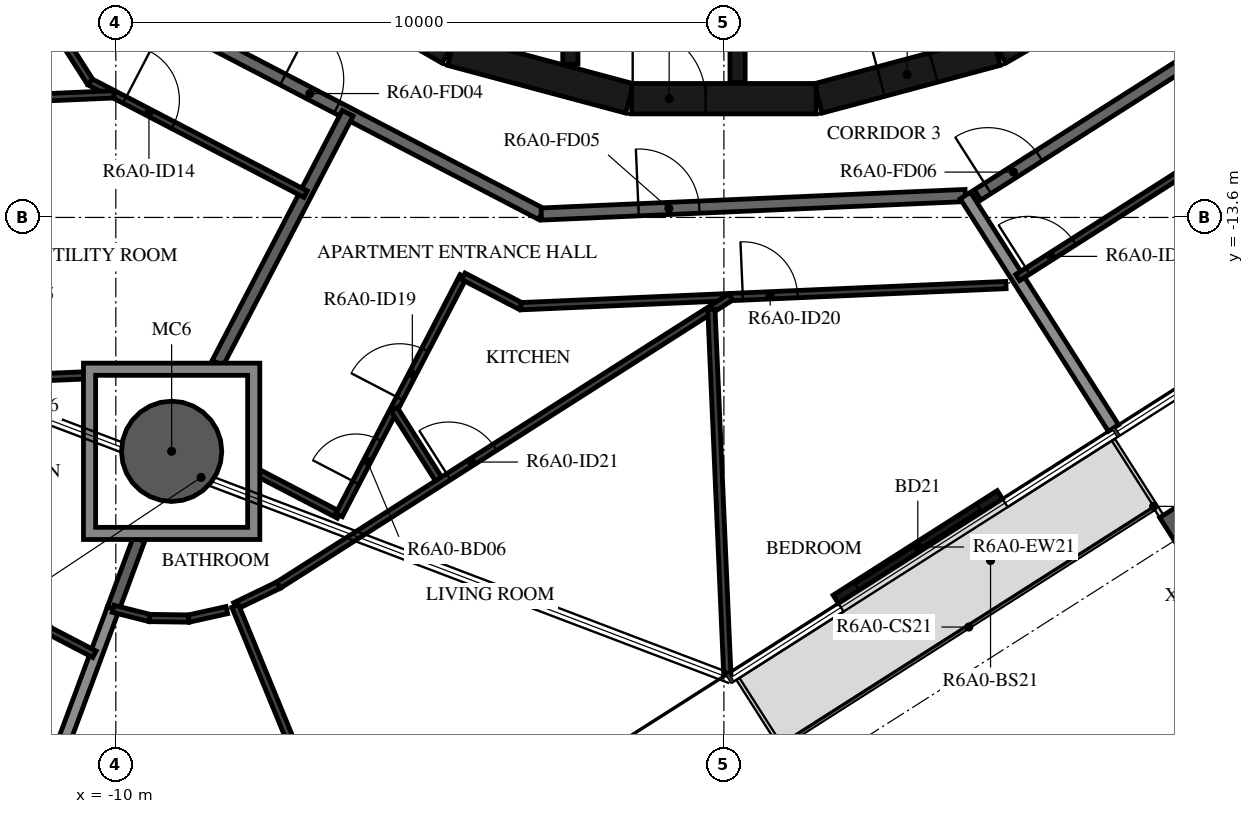
"""IFC4 building model, lengths in metres.
Left out: names, types, materials, properties, quantities, classifications, styles, units other than length and angle.
Written with IfcOpenShell. Run it as: python <this file> out.ifc"""

import sys

from ifc_helpers import new_model, si_unit, direction, frame, frame_2d, origin, origin_2d, place, context, subcontext, project, spatial, polyline, rectangle, hollow_circle, i_section, outline, extrude, element, fill, save


model = new_model("IFC4")
c1 = context("Model", 3, precision=1e-05, world=origin(), true_north=direction((0.0, 1.0)))
c2 = subcontext(c1, "Body", "Model", "MODEL_VIEW")
j1 = project(units=[si_unit("LENGTHUNIT", "METRE"), si_unit("PLANEANGLEUNIT", "RADIAN")], contexts=[c1])
p1 = place(None, origin())
s1 = spatial("IfcSite", under=j1, at=p1, CompositionType="ELEMENT")
p2 = place(p1, origin())
s2 = spatial("IfcBuilding", under=s1, at=p2, CompositionType="ELEMENT")
p3 = place(p2, frame((0.0, 0.0, 233.7)))
s3 = spatial("IfcBuildingStorey", under=s2, at=p3, CompositionType="ELEMENT", Elevation=233.7)
p4 = place(p3, frame((-9.082, -17.446, -0.38), z_axis=(0.0, 0.0, 1.0), x_axis=(1.0, 0.0, 0.0)))
e1 = element("IfcColumn", 1, at=p4, inside=s3, PredefinedType="COLUMN", context=c2, shape_type="SweptSolid", body=[
    extrude(hollow_circle(Radius=0.825, WallThickness=0.04, at=origin_2d()), origin(), (0.0, 0.0, 1.0), 3.5),
])
p5 = place(p3, frame((7.535, -18.835, -0.38), z_axis=(0.0, 0.0, 1.0), x_axis=(-0.843391139633, -0.537300088953, 0.0)))
e2 = element("IfcColumn", 2, at=p5, inside=s3, PredefinedType="COLUMN", context=c2, shape_type="SweptSolid", body=[
    extrude(i_section(OverallWidth=0.3, OverallDepth=0.9, WebThickness=0.019, FlangeThickness=0.035, FilletRadius=0.03, at=origin_2d()), origin(), (0.0, 0.0, 1.0), 3.5),
])
p6 = place(p3, frame((1.839, -19.879, 0.0), z_axis=(0.0, 0.0, 1.0), x_axis=(0.843419508298, 0.53725555653, 0.0)))
e3 = element("IfcWall", 3, at=p6, inside=s3, PredefinedType="STANDARD", context=c2, shape_type="SweptSolid", body=[
    extrude(rectangle(XDim=3.2, YDim=0.16, at=frame_2d((1.6, 0.0))), origin(), (0.0, 0.0, 1.0), 3.12),
])
p7 = place(p6, frame((0.4, 0.0, 0.0)))
e4 = element("IfcOpeningElement", 4, at=p7, cuts=e3, PredefinedType="OPENING", context=c2, shape_type="SweptSolid", body=[
    extrude(rectangle(XDim=2.4, YDim=2.4, at=frame_2d((1.2, 1.2))), frame((0.0, 0.09, 0.0), z_axis=(0.0, -1.0, 0.0), x_axis=(1.0, 0.0, 0.0)), (0.0, 0.0, 1.0), 0.18),
])
p8 = place(p3, frame((1.55, -11.643, 0.0), z_axis=(0.0, 0.0, 1.0), x_axis=(0.965948410781, 0.258734743916, 0.0)))
e5 = element("IfcWall", 5, at=p8, inside=s3, PredefinedType="SHEAR", context=c2, shape_type="SweptSolid", body=[
    extrude(rectangle(XDim=3.033, YDim=0.5, at=frame_2d((1.516, 0.0))), origin(), (0.0, 0.0, 1.0), 3.12),
])
p9 = place(p8, frame((1.066, 0.0, 0.0)))
e6 = element("IfcOpeningElement", 6, at=p9, cuts=e5, PredefinedType="OPENING", context=c2, shape_type="SweptSolid", body=[
    extrude(rectangle(XDim=0.9, YDim=2.1, at=frame_2d((0.45, 1.05))), frame((0.0, 0.26, 0.0), z_axis=(0.0, -1.0, 0.0), x_axis=(1.0, 0.0, 0.0)), (0.0, 0.0, 1.0), 0.52),
])
for number, where, z_axis, x_axis in (
    (7, (4.51, -10.845, 0.0), (0.0, 0.0, 1.0), (0.866, 0.5, 0.0)),
    (8, (-7.137, -9.329, 0.0), (0.0, 0.0, 1.0), (0.866, -0.5, 0.0)),
    (9, (-4.479, -10.858, 0.0), (0.0, 0.0, 1.0), (0.966, -0.259, 0.0)),
):
    element("IfcWall", number, at=place(p3, frame(where, z_axis=z_axis, x_axis=x_axis)), inside=s3, PredefinedType="SHEAR", context=c2, shape_type="SweptSolid", body=[
        extrude(rectangle(XDim=3.033, YDim=0.5, at=frame_2d((1.516, 0.0))), origin(), (0.0, 0.0, 1.0), 3.12),
    ])
p10 = place(p3, frame((-1.516, -11.647, 0.0), z_axis=(0.0, 0.0, 1.0), x_axis=(1.0, 0.0, 0.0)))
e10 = element("IfcWall", 10, at=p10, inside=s3, PredefinedType="SHEAR", context=c2, shape_type="SweptSolid", body=[
    extrude(rectangle(XDim=3.033, YDim=0.5, at=frame_2d((1.516, 0.0))), origin(), (0.0, 0.0, 1.0), 3.12),
])
p11 = place(p10, frame((0.016, 0.0, 0.0)))
e11 = element("IfcOpeningElement", 11, at=p11, cuts=e10, PredefinedType="OPENING", context=c2, shape_type="SweptSolid", body=[
    extrude(rectangle(XDim=1.2, YDim=2.1, at=frame_2d((0.6, 1.05))), frame((0.0, 0.26, 0.0), z_axis=(0.0, -1.0, 0.0), x_axis=(1.0, 0.0, 0.0)), (0.0, 0.0, 1.0), 0.52),
])
p12 = place(p3, frame((-2.525, -8.97, 0.0), z_axis=(0.0, 0.0, 1.0), x_axis=(0.0, -1.0, 0.0)))
e12 = element("IfcWall", 12, at=p12, inside=s3, PredefinedType="SHEAR", context=c2, shape_type="SweptSolid", body=[
    extrude(rectangle(XDim=2.11, YDim=0.25, at=frame_2d((1.055, 0.0))), origin(), (0.0, 0.0, 1.0), 3.12),
])
p13 = place(p3, frame((0.225, -8.97, 0.0), z_axis=(0.0, 0.0, 1.0), x_axis=(0.0, -1.0, 0.0)))
e13 = element("IfcWall", 13, at=p13, inside=s3, PredefinedType="SHEAR", context=c2, shape_type="SweptSolid", body=[
    extrude(rectangle(XDim=2.41, YDim=0.25, at=frame_2d((1.205, 0.0))), origin(), (0.0, 0.0, 1.0), 3.12),
])
p14 = place(p3, frame((-9.372, -10.228, 0.0), z_axis=(0.0, 0.0, 1.0), x_axis=(0.887005184532, -0.461759464021, 0.0)))
e14 = element("IfcWall", 14, at=p14, inside=s3, PredefinedType="STANDARD", context=c2, shape_type="SweptSolid", body=[
    extrude(rectangle(XDim=7.181, YDim=0.2, at=frame_2d((3.591, 0.0))), origin(), (0.0, 0.0, 1.0), 3.12),
])
p15 = place(p14, frame((2.391, 0.0, 0.0)))
e15 = element("IfcOpeningElement", 15, at=p15, cuts=e14, PredefinedType="OPENING", context=c2, shape_type="SweptSolid", body=[
    extrude(rectangle(XDim=1.0, YDim=2.1, at=frame_2d((0.5, 1.05))), frame((0.0, 0.11, 0.0), z_axis=(0.0, -1.0, 0.0), x_axis=(1.0, 0.0, 0.0)), (0.0, 0.0, 1.0), 0.22),
])
p16 = place(p3, frame((-3.003, -13.544, 0.0), z_axis=(0.0, 0.0, 1.0), x_axis=(0.999048221872, 0.043619380718, 0.0)))
e16 = element("IfcWall", 16, at=p16, inside=s3, PredefinedType="STANDARD", context=c2, shape_type="SweptSolid", body=[
    extrude(rectangle(XDim=6.979, YDim=0.2, at=frame_2d((3.49, 0.0))), origin(), (0.0, 0.0, 1.0), 3.12),
])
p17 = place(p16, frame((1.6, 0.0, 0.0)))
e17 = element("IfcOpeningElement", 17, at=p17, cuts=e16, PredefinedType="OPENING", context=c2, shape_type="SweptSolid", body=[
    extrude(rectangle(XDim=1.0, YDim=2.1, at=frame_2d((0.5, 1.05))), frame((0.0, 0.11, 0.0), z_axis=(0.0, -1.0, 0.0), x_axis=(1.0, 0.0, 0.0)), (0.0, 0.0, 1.0), 0.22),
])
p18 = place(p3, frame((4.172, -13.231, 0.0), z_axis=(0.0, 0.0, 1.0), x_axis=(0.843388394728, 0.537304397561, 0.0)))
e18 = element("IfcWall", 18, at=p18, inside=s3, PredefinedType="STANDARD", context=c2, shape_type="SweptSolid", body=[
    extrude(rectangle(XDim=7.181, YDim=0.2, at=frame_2d((3.59, 0.0))), origin(), (0.0, 0.0, 1.0), 3.12),
])
p19 = place(p18, frame((0.2, 0.0, 0.0)))
e19 = element("IfcOpeningElement", 19, at=p19, cuts=e18, PredefinedType="OPENING", context=c2, shape_type="SweptSolid", body=[
    extrude(rectangle(XDim=1.0, YDim=2.1, at=frame_2d((0.5, 1.05))), frame((0.0, 0.11, 0.0), z_axis=(0.0, -1.0, 0.0), x_axis=(1.0, 0.0, 0.0)), (0.0, 0.0, 1.0), 0.22),
])
p20 = place(p3, frame((-8.326, -15.996, 0.0), z_axis=(0.0, 0.0, 1.0), x_axis=(0.461739255077, 0.887015704664, 0.0)))
e20 = element("IfcWall", 20, at=p20, inside=s3, PredefinedType="STANDARD", context=c2, shape_type="SweptSolid", body=[
    extrude(rectangle(XDim=4.633, YDim=0.2, at=frame_2d((2.317, 0.0))), origin(), (0.0, 0.0, 1.0), 3.12),
])
p21 = place(p3, frame((-11.865, -24.939, 0.0), z_axis=(0.0, 0.0, 1.0), x_axis=(0.348236919929, 0.937406554062, 0.0)))
e21 = element("IfcWall", 21, at=p21, inside=s3, PredefinedType="STANDARD", context=c2, shape_type="SweptSolid", body=[
    extrude(rectangle(XDim=5.231, YDim=0.2, at=frame_2d((2.615, 0.0))), origin(), (0.0, 0.0, 1.0), 2.73),
])
p22 = place(p3, frame((-10.044, -20.036, 0.0), z_axis=(0.0, 0.0, 1.0), x_axis=(0.348282344491, 0.937389678051, 0.0)))
e22 = element("IfcWall", 22, at=p22, inside=s3, PredefinedType="STANDARD", context=c2, shape_type="SweptSolid", body=[
    extrude(rectangle(XDim=1.216, YDim=0.2, at=frame_2d((0.608, 0.0))), origin(), (0.0, 0.0, 1.0), 3.12),
])
p23 = place(p3, frame((6.407, -17.064, 0.0), z_axis=(0.0, 0.0, 1.0), x_axis=(-0.537324777979, 0.843375410461, 0.0)))
e23 = element("IfcWall", 23, at=p23, inside=s3, PredefinedType="STANDARD", context=c2, shape_type="SweptSolid", body=[
    extrude(rectangle(XDim=4.535, YDim=0.2, at=frame_2d((2.268, 0.0))), origin(), (0.0, 0.0, 1.0), 2.73),
])
p24 = place(p3, frame((-13.137, -7.111, 0.0), z_axis=(0.0, 0.0, 1.0), x_axis=(0.537300549444, -0.843390846267, 0.0)))
e24 = element("IfcWall", 24, at=p24, inside=s3, PredefinedType="PARTITIONING", context=c2, shape_type="SweptSolid", body=[
    extrude(rectangle(XDim=5.054, YDim=0.12, at=frame_2d((2.527, 0.0))), origin(), (0.0, 0.0, 1.0), 3.12),
])
p25 = place(p24, frame((1.5, 0.0, 0.0)))
e25 = element("IfcOpeningElement", 25, at=p25, cuts=e24, PredefinedType="OPENING", context=c2, shape_type="SweptSolid", body=[
    extrude(rectangle(XDim=0.8, YDim=2.1, at=frame_2d((0.4, 1.05))), frame((0.0, 0.07, 0.0), z_axis=(0.0, -1.0, 0.0), x_axis=(1.0, 0.0, 0.0)), (0.0, 0.0, 1.0), 0.14),
])
p26 = place(p3, frame((-10.421, -11.373, 0.0), z_axis=(0.0, 0.0, 1.0), x_axis=(0.887006451745, -0.461757029792, 0.0)))
e26 = element("IfcWall", 26, at=p26, inside=s3, PredefinedType="PARTITIONING", context=c2, shape_type="SweptSolid", body=[
    extrude(rectangle(XDim=3.992, YDim=0.12, at=frame_2d((1.996, 0.0))), origin(), (0.0, 0.0, 1.0), 3.12),
])
p27 = place(p26, frame((0.639, 0.0, 0.0)))
e27 = element("IfcOpeningElement", 27, at=p27, cuts=e26, PredefinedType="OPENING", context=c2, shape_type="SweptSolid", body=[
    extrude(rectangle(XDim=0.9, YDim=2.1, at=frame_2d((0.45, 1.05))), frame((0.0, 0.07, 0.0), z_axis=(0.0, -1.0, 0.0), x_axis=(1.0, 0.0, 0.0)), (0.0, 0.0, 1.0), 0.14),
])
p28 = place(p3, frame((-12.936, -11.703, 0.0), z_axis=(0.0, 0.0, 1.0), x_axis=(0.999046310188, 0.043663143495, 0.0)))
e28 = element("IfcWall", 28, at=p28, inside=s3, PredefinedType="PARTITIONING", context=c2, shape_type="SweptSolid", body=[
    extrude(rectangle(XDim=2.907, YDim=0.12, at=frame_2d((1.454, 0.0))), origin(), (0.0, 0.0, 1.0), 3.12),
])
p29 = place(p3, frame((-12.736, -16.295, 0.0), z_axis=(0.0, 0.0, 1.0), x_axis=(0.999043796611, 0.043720618177, 0.0)))
e29 = element("IfcWall", 29, at=p29, inside=s3, PredefinedType="PARTITIONING", context=c2, shape_type="SweptSolid", body=[
    extrude(rectangle(XDim=2.206, YDim=0.12, at=frame_2d((1.103, 0.0))), origin(), (0.0, 0.0, 1.0), 3.12),
])
p30 = place(p29, frame((0.6, 0.0, 0.0)))
e30 = element("IfcOpeningElement", 30, at=p30, cuts=e29, PredefinedType="OPENING", context=c2, shape_type="SweptSolid", body=[
    extrude(rectangle(XDim=0.9, YDim=2.1, at=frame_2d((0.45, 1.05))), frame((0.0, 0.07, 0.0), z_axis=(0.0, -1.0, 0.0), x_axis=(1.0, 0.0, 0.0)), (0.0, 0.0, 1.0), 0.14),
])
p31 = place(p3, frame((-10.352, -20.783, 0.0), z_axis=(0.0, 0.0, 1.0), x_axis=(-0.886941739106, 0.461881317475, 0.0)))
e31 = element("IfcWall", 31, at=p31, inside=s3, PredefinedType="PARTITIONING", context=c2, shape_type="SweptSolid", body=[
    extrude(rectangle(XDim=0.829, YDim=0.12, at=frame_2d((0.415, 0.0))), origin(), (0.0, 0.0, 1.0), 3.12),
])
p32 = place(p3, frame((-7.632, -17.815, 0.0), z_axis=(0.0, 0.0, 1.0), x_axis=(0.886960889958, -0.461844540602, 0.0)))
e32 = element("IfcWall", 32, at=p32, inside=s3, PredefinedType="PARTITIONING", context=c2, shape_type="SweptSolid", body=[
    extrude(rectangle(XDim=1.469, YDim=0.12, at=frame_2d((0.734, 0.0))), origin(), (0.0, 0.0, 1.0), 3.12),
])
p33 = place(p3, frame((-6.329, -18.494, 0.0), z_axis=(0.0, 0.0, 1.0), x_axis=(0.461759058182, 0.887005395805, 0.0)))
e33 = element("IfcWall", 33, at=p33, inside=s3, PredefinedType="PARTITIONING", context=c2, shape_type="SweptSolid", body=[
    extrude(rectangle(XDim=4.427, YDim=0.12, at=frame_2d((2.213, 0.0))), origin(), (0.0, 0.0, 1.0), 3.12),
])
p34 = place(p33, frame((0.6, 0.0, 0.0)))
e34 = element("IfcOpeningElement", 34, at=p34, cuts=e33, PredefinedType="OPENING", context=c2, shape_type="SweptSolid", body=[
    extrude(rectangle(XDim=0.8, YDim=2.1, at=frame_2d((0.4, 1.05))), frame((0.0, 0.07, 0.0), z_axis=(0.0, -1.0, 0.0), x_axis=(1.0, 0.0, 0.0)), (0.0, 0.0, 1.0), 0.14),
])
p35 = place(p33, frame((2.161, 0.0, 0.0)))
e35 = element("IfcOpeningElement", 35, at=p35, cuts=e33, PredefinedType="OPENING", context=c2, shape_type="SweptSolid", body=[
    extrude(rectangle(XDim=0.9, YDim=2.1, at=frame_2d((0.45, 1.05))), frame((0.0, 0.07, 0.0), z_axis=(0.0, -1.0, 0.0), x_axis=(1.0, 0.0, 0.0)), (0.0, 0.0, 1.0), 0.14),
])
p36 = place(p3, frame((-4.285, -14.567, 0.0), z_axis=(0.0, 0.0, 1.0), x_axis=(0.887033177378, -0.46170568789, 0.0)))
e36 = element("IfcWall", 36, at=p36, inside=s3, PredefinedType="PARTITIONING", context=c2, shape_type="SweptSolid", body=[
    extrude(rectangle(XDim=1.067, YDim=0.12, at=frame_2d((0.534, 0.0))), origin(), (0.0, 0.0, 1.0), 3.12),
])
p37 = place(p3, frame((-3.339, -15.06, 0.0), z_axis=(0.0, 0.0, 1.0), x_axis=(0.999047716945, 0.043630943905, 0.0)))
e37 = element("IfcWall", 37, at=p37, inside=s3, PredefinedType="PARTITIONING", context=c2, shape_type="SweptSolid", body=[
    extrude(rectangle(XDim=7.985, YDim=0.12, at=frame_2d((3.992, 0.0))), origin(), (0.0, 0.0, 1.0), 3.12),
])
p38 = place(p37, frame((3.654, 0.0, 0.0)))
e38 = element("IfcOpeningElement", 38, at=p38, cuts=e37, PredefinedType="OPENING", context=c2, shape_type="SweptSolid", body=[
    extrude(rectangle(XDim=0.9, YDim=2.1, at=frame_2d((0.45, 1.05))), frame((0.0, 0.07, 0.0), z_axis=(0.0, -1.0, 0.0), x_axis=(1.0, 0.0, 0.0)), (0.0, 0.0, 1.0), 0.14),
])
p39 = place(p3, frame((-10.044, -20.036, 0.0), z_axis=(0.0, 0.0, 1.0), x_axis=(0.969630684539, -0.24457378355, 0.0)))
e39 = element("IfcWall", 39, at=p39, inside=s3, PredefinedType="PARTITIONING", context=c2, shape_type="SweptSolid", body=[
    extrude(rectangle(XDim=0.62, YDim=0.12, at=frame_2d((0.31, 0.0))), origin(), (0.0, 0.0, 1.0), 3.12),
])
for number, where, z_axis, x_axis in (
    (40, (-9.443, -20.187, 0.0), (0.0, 0.0, 1.0), (1.0, -0.014, 0.0)),
    (41, (-8.801, -20.197, 0.0), (0.0, 0.0, 1.0), (0.976, 0.216, 0.0)),
):
    element("IfcWall", number, at=place(p3, frame(where, z_axis=z_axis, x_axis=x_axis)), inside=s3, PredefinedType="PARTITIONING", context=c2, shape_type="SweptSolid", body=[
        extrude(rectangle(XDim=0.642, YDim=0.12, at=frame_2d((0.321, 0.0))), origin(), (0.0, 0.0, 1.0), 3.12),
    ])
p40 = place(p3, frame((-4.662, -17.95, 0.0), z_axis=(0.0, 0.0, 1.0), x_axis=(-0.537254271207, 0.843420327043, 0.0)))
e42 = element("IfcWall", 42, at=p40, inside=s3, PredefinedType="PARTITIONING", context=c2, shape_type="SweptSolid", body=[
    extrude(rectangle(XDim=1.418, YDim=0.12, at=frame_2d((0.709, 0.0))), origin(), (0.0, 0.0, 1.0), 3.12),
])
p41 = place(p3, frame((-8.037, -19.991, 0.0), z_axis=(0.0, 0.0, 1.0), x_axis=(0.900073671326, 0.435737749323, 0.0)))
e43 = element("IfcWall", 43, at=p41, inside=s3, PredefinedType="PARTITIONING", context=c2, shape_type="SweptSolid", body=[
    extrude(rectangle(XDim=0.794, YDim=0.12, at=frame_2d((0.397, 0.0))), origin(), (0.0, 0.0, 1.0), 3.12),
])
p42 = place(p3, frame((-7.322, -19.645, 0.0), z_axis=(0.0, 0.0, 1.0), x_axis=(0.843385361817, 0.537309158188, 0.0)))
e44 = element("IfcWall", 44, at=p42, inside=s3, PredefinedType="PARTITIONING", context=c2, shape_type="SweptSolid", body=[
    extrude(rectangle(XDim=8.814, YDim=0.12, at=frame_2d((4.407, 0.0))), origin(), (0.0, 0.0, 1.0), 3.12),
])
p43 = place(p42, frame((3.314, 0.0, 0.0)))
e45 = element("IfcOpeningElement", 45, at=p43, cuts=e44, PredefinedType="OPENING", context=c2, shape_type="SweptSolid", body=[
    extrude(rectangle(XDim=0.9, YDim=2.1, at=frame_2d((0.45, 1.05))), frame((0.0, 0.07, 0.0), z_axis=(0.0, -1.0, 0.0), x_axis=(1.0, 0.0, 0.0)), (0.0, 0.0, 1.0), 0.14),
])
p44 = place(p3, frame((-6.057, -24.81, 0.0), z_axis=(0.0, 0.0, 1.0), x_axis=(-0.380052033163, 0.924965108579, 0.0)))
e46 = element("IfcWall", 46, at=p44, inside=s3, PredefinedType="PARTITIONING", context=c2, shape_type="SweptSolid", body=[
    extrude(rectangle(XDim=5.21, YDim=0.12, at=frame_2d((2.605, 0.0))), origin(), (0.0, 0.0, 1.0), 3.12),
])
p45 = place(p44, frame((0.2, 0.0, 0.0)))
e47 = element("IfcOpeningElement", 47, at=p45, cuts=e46, PredefinedType="OPENING", context=c2, shape_type="SweptSolid", body=[
    extrude(rectangle(XDim=0.9, YDim=2.1, at=frame_2d((0.45, 1.05))), frame((0.0, 0.07, 0.0), z_axis=(0.0, -1.0, 0.0), x_axis=(1.0, 0.0, 0.0)), (0.0, 0.0, 1.0), 0.14),
])
p46 = place(p3, frame((0.056, -21.11, 0.0), z_axis=(0.0, 0.0, 1.0), x_axis=(-0.043629559022, 0.999047777426, 0.0)))
e48 = element("IfcWall", 48, at=p46, inside=s3, PredefinedType="PARTITIONING", context=c2, shape_type="SweptSolid", body=[
    extrude(rectangle(XDim=6.004, YDim=0.12, at=frame_2d((3.002, 0.0))), origin(), (0.0, 0.0, 1.0), 3.12),
])
p47 = place(p3, frame((4.83, -14.59, 0.0), z_axis=(0.0, 0.0, 1.0), x_axis=(0.843393042763, 0.537297101629, 0.0)))
e49 = element("IfcWall", 49, at=p47, inside=s3, PredefinedType="PARTITIONING", context=c2, shape_type="SweptSolid", body=[
    extrude(rectangle(XDim=7.53, YDim=0.12, at=frame_2d((3.765, 0.0))), origin(), (0.0, 0.0, 1.0), 3.12),
])
p48 = place(p47, frame((0.2, 0.0, 0.0)))
e50 = element("IfcOpeningElement", 50, at=p48, cuts=e49, PredefinedType="OPENING", context=c2, shape_type="SweptSolid", body=[
    extrude(rectangle(XDim=0.9, YDim=2.1, at=frame_2d((0.45, 1.05))), frame((0.0, 0.07, 0.0), z_axis=(0.0, -1.0, 0.0), x_axis=(1.0, 0.0, 0.0)), (0.0, 0.0, 1.0), 0.14),
])
p49 = place(p3, origin())
e51 = element("IfcWall", 51, at=p49, inside=s3, PredefinedType="STANDARD", context=c2, shape_type="SweptSolid", body=[
    extrude(outline(polyline([(-7.632, -15.996), (-7.632, -18.896), (-10.532, -18.896), (-10.532, -15.996), (-7.632, -15.996)]), holes=[polyline([(-10.332, -18.696), (-7.832, -18.696), (-7.832, -16.196), (-10.332, -16.196), (-10.332, -18.696)])]), origin(), (0.0, 0.0, 1.0), 3.12),
])
p50 = place(p7, origin())
e52 = element("IfcDoor", 52, at=p50, inside=s3, OperationType="DOUBLE_DOOR_SLIDING", PredefinedType="DOOR", context=c2, shape_type="SweptSolid", body=[
    extrude(rectangle(XDim=2.4, YDim=2.4, at=frame_2d((1.2, 1.2))), frame((0.0, 0.025, 0.0), z_axis=(0.0, -1.0, 0.0), x_axis=(1.0, 0.0, 0.0)), (0.0, 0.0, 1.0), 0.05),
])
fill(e4, e52)
p51 = place(p11, origin())
e53 = element("IfcDoor", 53, at=p51, inside=s3, OperationType="SINGLE_SWING_RIGHT", PredefinedType="DOOR", context=c2, shape_type="SweptSolid", body=[
    extrude(rectangle(XDim=1.2, YDim=2.1, at=frame_2d((0.6, 1.05))), frame((0.0, 0.025, 0.0), z_axis=(0.0, -1.0, 0.0), x_axis=(1.0, 0.0, 0.0)), (0.0, 0.0, 1.0), 0.05),
])
fill(e11, e53)
p52 = place(p9, origin())
e54 = element("IfcDoor", 54, at=p52, inside=s3, OperationType="SINGLE_SWING_LEFT", PredefinedType="DOOR", context=c2, shape_type="SweptSolid", body=[
    extrude(rectangle(XDim=0.9, YDim=2.1, at=frame_2d((0.45, 1.05))), frame((0.0, 0.025, 0.0), z_axis=(0.0, -1.0, 0.0), x_axis=(1.0, 0.0, 0.0)), (0.0, 0.0, 1.0), 0.05),
])
fill(e6, e54)
p53 = place(p15, origin())
e55 = element("IfcDoor", 55, at=p53, inside=s3, OperationType="SINGLE_SWING_RIGHT", PredefinedType="DOOR", context=c2, shape_type="SweptSolid", body=[
    extrude(rectangle(XDim=1.0, YDim=2.1, at=frame_2d((0.5, 1.05))), frame((0.0, 0.025, 0.0), z_axis=(0.0, -1.0, 0.0), x_axis=(1.0, 0.0, 0.0)), (0.0, 0.0, 1.0), 0.05),
])
fill(e15, e55)
p54 = place(p27, origin())
e56 = element("IfcDoor", 56, at=p54, inside=s3, OperationType="SINGLE_SWING_RIGHT", PredefinedType="DOOR", context=c2, shape_type="SweptSolid", body=[
    extrude(rectangle(XDim=0.9, YDim=2.1, at=frame_2d((0.45, 1.05))), frame((0.0, 0.025, 0.0), z_axis=(0.0, -1.0, 0.0), x_axis=(1.0, 0.0, 0.0)), (0.0, 0.0, 1.0), 0.05),
])
fill(e27, e56)
p55 = place(p17, origin())
e57 = element("IfcDoor", 57, at=p55, inside=s3, OperationType="SINGLE_SWING_LEFT", PredefinedType="DOOR", context=c2, shape_type="SweptSolid", body=[
    extrude(rectangle(XDim=1.0, YDim=2.1, at=frame_2d((0.5, 1.05))), frame((0.0, 0.025, 0.0), z_axis=(0.0, -1.0, 0.0), x_axis=(1.0, 0.0, 0.0)), (0.0, 0.0, 1.0), 0.05),
])
fill(e17, e57)
p56 = place(p34, origin())
e58 = element("IfcDoor", 58, at=p56, inside=s3, OperationType="SINGLE_SWING_LEFT", PredefinedType="DOOR", context=c2, shape_type="SweptSolid", body=[
    extrude(rectangle(XDim=0.8, YDim=2.1, at=frame_2d((0.4, 1.05))), frame((0.0, 0.025, 0.0), z_axis=(0.0, -1.0, 0.0), x_axis=(1.0, 0.0, 0.0)), (0.0, 0.0, 1.0), 0.05),
])
fill(e34, e58)
p57 = place(p35, origin())
e59 = element("IfcDoor", 59, at=p57, inside=s3, OperationType="SINGLE_SWING_LEFT", PredefinedType="DOOR", context=c2, shape_type="SweptSolid", body=[
    extrude(rectangle(XDim=0.9, YDim=2.1, at=frame_2d((0.45, 1.05))), frame((0.0, 0.025, 0.0), z_axis=(0.0, -1.0, 0.0), x_axis=(1.0, 0.0, 0.0)), (0.0, 0.0, 1.0), 0.05),
])
fill(e35, e59)
p58 = place(p38, origin())
e60 = element("IfcDoor", 60, at=p58, inside=s3, OperationType="SINGLE_SWING_LEFT", PredefinedType="DOOR", context=c2, shape_type="SweptSolid", body=[
    extrude(rectangle(XDim=0.9, YDim=2.1, at=frame_2d((0.45, 1.05))), frame((0.0, 0.025, 0.0), z_axis=(0.0, -1.0, 0.0), x_axis=(1.0, 0.0, 0.0)), (0.0, 0.0, 1.0), 0.05),
])
fill(e38, e60)
p59 = place(p43, origin())
e61 = element("IfcDoor", 61, at=p59, inside=s3, OperationType="SINGLE_SWING_LEFT", PredefinedType="DOOR", context=c2, shape_type="SweptSolid", body=[
    extrude(rectangle(XDim=0.9, YDim=2.1, at=frame_2d((0.45, 1.05))), frame((0.0, 0.025, 0.0), z_axis=(0.0, -1.0, 0.0), x_axis=(1.0, 0.0, 0.0)), (0.0, 0.0, 1.0), 0.05),
])
fill(e45, e61)
p60 = place(p19, origin())
e62 = element("IfcDoor", 62, at=p60, inside=s3, OperationType="SINGLE_SWING_LEFT", PredefinedType="DOOR", context=c2, shape_type="SweptSolid", body=[
    extrude(rectangle(XDim=1.0, YDim=2.1, at=frame_2d((0.5, 1.05))), frame((0.0, 0.025, 0.0), z_axis=(0.0, -1.0, 0.0), x_axis=(1.0, 0.0, 0.0)), (0.0, 0.0, 1.0), 0.05),
])
fill(e19, e62)
p61 = place(p48, origin())
e63 = element("IfcDoor", 63, at=p61, inside=s3, OperationType="SINGLE_SWING_LEFT", PredefinedType="DOOR", context=c2, shape_type="SweptSolid", body=[
    extrude(rectangle(XDim=0.9, YDim=2.1, at=frame_2d((0.45, 1.05))), frame((0.0, 0.025, 0.0), z_axis=(0.0, -1.0, 0.0), x_axis=(1.0, 0.0, 0.0)), (0.0, 0.0, 1.0), 0.05),
])
fill(e50, e63)
save(model, sys.argv[1])
